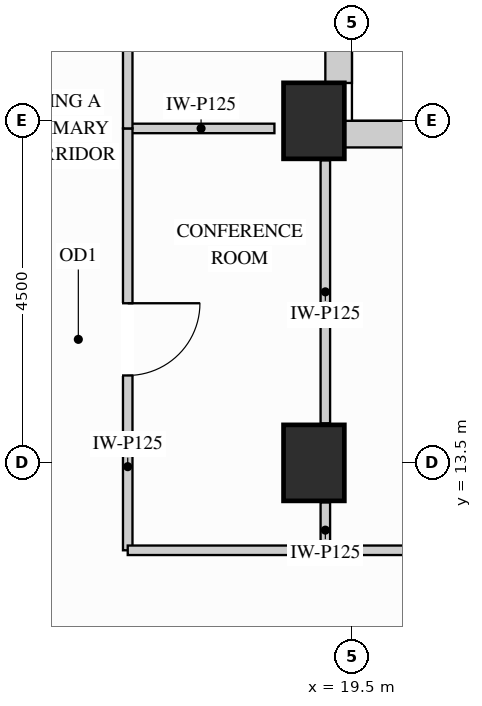
"""IFC4 building model, lengths in metres.
Left out: names, types, materials, properties, quantities, classifications, styles, units other than length and angle.
Written with IfcOpenShell. Run it as: python <this file> out.ifc"""

import sys

from ifc_helpers import new_model, si_unit, direction, frame, frame_2d, origin, origin_2d, place, context, subcontext, project, spatial, rectangle, extrude, source, transform, mapped, element, fill, save


model = new_model("IFC4")
c1 = context("Model", 3, precision=1e-05, world=origin(), true_north=direction((0.0, 1.0)))
c2 = subcontext(c1, "Body", "Model", "MODEL_VIEW")
j1 = project(units=[si_unit("LENGTHUNIT", "METRE"), si_unit("PLANEANGLEUNIT", "RADIAN")], contexts=[c1])
p1 = place(None, origin())
s1 = spatial("IfcSite", under=j1, at=p1, CompositionType="ELEMENT")
p2 = place(p1, origin())
s2 = spatial("IfcBuilding", under=s1, at=p2, CompositionType="ELEMENT")
p3 = place(p2, frame((0.0, 0.0, 171.9)))
s3 = spatial("IfcBuildingStorey", under=s2, at=p3, CompositionType="ELEMENT", Elevation=171.9)
m1 = source(origin(), c2, "Body", "SweptSolid", [
    extrude(rectangle(XDim=0.8, YDim=1.0, at=origin_2d()), origin(), (0.0, 0.0, 1.0), 3.4),
])
for number, where, z_axis, x_axis in (
    (1, (19.0, 13.5, 0.0), (0.0, 0.0, 1.0), (1.0, 0.0, 0.0)),
    (2, (19.0, 18.0, 0.0), (0.0, 0.0, 1.0), (1.0, 0.0, 0.0)),
):
    element("IfcColumn", number, at=place(p3, frame(where, z_axis=z_axis, x_axis=x_axis)), inside=s3, PredefinedType="COLUMN", context=c2, shape_type="MappedRepresentation", body=[
        mapped(m1, transform((0.0, 0.0, 0.0), x_axis=(1.0, 0.0, 0.0), y_axis=(0.0, 1.0, 0.0), z_axis=(0.0, 0.0, 1.0))),
    ])
p4 = place(p3, frame((34.502, 17.825, 0.0), z_axis=(0.0, 0.0, 1.0), x_axis=(-1.0, 0.0, 0.0)))
e3 = element("IfcWall", 3, at=p4, inside=s3, PredefinedType="SOLIDWALL", context=c2, shape_type="SweptSolid", body=[
    extrude(rectangle(XDim=15.104, YDim=0.35, at=frame_2d((7.552, 0.0))), origin(), (0.0, 0.0, 1.0), 3.385),
])
p5 = place(p4, frame((4.131, 0.0, 0.78)))
e4 = element("IfcOpeningElement", 4, at=p5, cuts=e3, PredefinedType="OPENING", context=c2, shape_type="SweptSolid", body=[
    extrude(rectangle(XDim=1.5, YDim=2.0, at=frame_2d((0.75, 1.0))), frame((0.0, 0.185, 0.0), z_axis=(0.0, -1.0, 0.0), x_axis=(1.0, 0.0, 0.0)), (0.0, 0.0, 1.0), 0.37),
])
p6 = place(p4, frame((9.442, 0.0, 0.78)))
e5 = element("IfcOpeningElement", 5, at=p6, cuts=e3, PredefinedType="OPENING", context=c2, shape_type="SweptSolid", body=[
    extrude(rectangle(XDim=1.5, YDim=2.0, at=frame_2d((0.75, 1.0))), frame((0.0, 0.185, 0.0), z_axis=(0.0, -1.0, 0.0), x_axis=(1.0, 0.0, 0.0)), (0.0, 0.0, 1.0), 0.37),
])
p7 = place(p3, frame((19.325, 18.498, 0.0), z_axis=(0.0, 0.0, 1.0), x_axis=(0.0, 1.0, 0.0)))
e6 = element("IfcWall", 6, at=p7, inside=s3, PredefinedType="SOLIDWALL", context=c2, shape_type="SweptSolid", body=[
    extrude(rectangle(XDim=3.504, YDim=0.35, at=frame_2d((1.752, 0.0))), origin(), (0.0, 0.0, 1.0), 2.612),
])
p8 = place(p7, frame((0.433, 0.0, 0.78)))
e7 = element("IfcOpeningElement", 7, at=p8, cuts=e6, PredefinedType="OPENING", context=c2, shape_type="SweptSolid", body=[
    extrude(rectangle(XDim=1.2, YDim=1.652, at=frame_2d((0.6, 0.826))), frame((0.0, 0.185, 0.0), z_axis=(0.0, -1.0, 0.0), x_axis=(1.0, 0.0, 0.0)), (0.0, 0.0, 1.0), 0.37),
])
m2 = source(origin(), c2, "Body", "SweptSolid", [
    extrude(rectangle(XDim=1.93, YDim=0.125, at=frame_2d((0.965, 0.0))), origin(), (0.0, 0.0, 1.0), 2.773),
])
p9 = place(p3, frame((16.55, 17.9, 0.0), z_axis=(0.0, 0.0, 1.0), x_axis=(1.0, 0.0, 0.0)))
e8 = element("IfcWall", 8, at=p9, inside=s3, PredefinedType="PARTITIONING", context=c2, shape_type="MappedRepresentation", body=[
    mapped(m2, transform((0.0, 0.0, 0.0), x_axis=(1.0, 0.0, 0.0), y_axis=(0.0, 1.0, 0.0), z_axis=(0.0, 0.0, 1.0))),
])
m3 = source(origin(), c2, "Body", "SweptSolid", [
    extrude(rectangle(XDim=0.63, YDim=0.125, at=frame_2d((0.315, 0.0))), origin(), (0.0, 0.0, 1.0), 2.773),
])
p10 = place(p3, frame((19.15, 12.35, 0.0), z_axis=(0.0, 0.0, 1.0), x_axis=(0.0, 1.0, 0.0)))
e9 = element("IfcWall", 9, at=p10, inside=s3, PredefinedType="PARTITIONING", context=c2, shape_type="MappedRepresentation", body=[
    mapped(m3, transform((0.0, 0.0, 0.0), x_axis=(1.0, 0.0, 0.0), y_axis=(0.0, 1.0, 0.0), z_axis=(0.0, 0.0, 1.0))),
])
m4 = source(origin(), c2, "Body", "SweptSolid", [
    extrude(rectangle(XDim=3.46, YDim=0.125, at=frame_2d((1.73, 0.0))), origin(), (0.0, 0.0, 1.0), 2.773),
])
p11 = place(p3, frame((19.15, 14.02, 0.0), z_axis=(0.0, 0.0, 1.0), x_axis=(0.0, 1.0, 0.0)))
e10 = element("IfcWall", 10, at=p11, inside=s3, PredefinedType="PARTITIONING", context=c2, shape_type="MappedRepresentation", body=[
    mapped(m4, transform((0.0, 0.0, 0.0), x_axis=(1.0, 0.0, 0.0), y_axis=(0.0, 1.0, 0.0), z_axis=(0.0, 0.0, 1.0))),
])
p12 = place(p3, frame((16.55, 12.35, 0.0), z_axis=(0.0, 0.0, 1.0), x_axis=(0.0, 1.0, 0.0)))
e11 = element("IfcWall", 11, at=p12, inside=s3, PredefinedType="PARTITIONING", context=c2, shape_type="SweptSolid", body=[
    extrude(rectangle(XDim=5.55, YDim=0.125, at=frame_2d((2.775, 0.0))), origin(), (0.0, 0.0, 1.0), 3.385),
])
p13 = place(p12, frame((2.3, 0.0, 0.0)))
e12 = element("IfcOpeningElement", 12, at=p13, cuts=e11, PredefinedType="OPENING", context=c2, shape_type="SweptSolid", body=[
    extrude(rectangle(XDim=0.95, YDim=2.15, at=frame_2d((0.475, 1.075))), frame((0.0, 0.073, 0.0), z_axis=(0.0, -1.0, 0.0), x_axis=(1.0, 0.0, 0.0)), (0.0, 0.0, 1.0), 0.145),
])
p14 = place(p3, frame((16.55, 17.9, 0.0), z_axis=(0.0, 0.0, 1.0), x_axis=(0.0, 1.0, 0.0)))
e13 = element("IfcWall", 13, at=p14, inside=s3, PredefinedType="PARTITIONING", context=c2, shape_type="SweptSolid", body=[
    extrude(rectangle(XDim=5.45, YDim=0.125, at=frame_2d((2.725, 0.0))), origin(), (0.0, 0.0, 1.0), 3.385),
])
p15 = place(p14, frame((2.25, 0.0, 0.0)))
e14 = element("IfcOpeningElement", 14, at=p15, cuts=e13, PredefinedType="OPENING", context=c2, shape_type="SweptSolid", body=[
    extrude(rectangle(XDim=0.95, YDim=2.15, at=frame_2d((0.475, 1.075))), frame((0.0, 0.073, 0.0), z_axis=(0.0, -1.0, 0.0), x_axis=(1.0, 0.0, 0.0)), (0.0, 0.0, 1.0), 0.145),
])
m5 = source(origin(), c2, "Body", "SweptSolid", [
    extrude(rectangle(XDim=2.95, YDim=0.125, at=frame_2d((1.475, 0.0))), origin(), (0.0, 0.0, 1.0), 3.385),
])
p16 = place(p3, frame((16.55, 12.35, 0.0), z_axis=(0.0, 0.0, 1.0), x_axis=(1.0, 0.0, 0.0)))
e15 = element("IfcWall", 15, at=p16, inside=s3, PredefinedType="PARTITIONING", context=c2, shape_type="MappedRepresentation", body=[
    mapped(m5, transform((0.0, 0.0, 0.0), x_axis=(1.0, 0.0, 0.0), y_axis=(0.0, 1.0, 0.0), z_axis=(0.0, 0.0, 1.0))),
])
p17 = place(p3, frame((19.5, 12.35, 0.0), z_axis=(0.0, 0.0, 1.0), x_axis=(1.0, 0.0, 0.0)))
e16 = element("IfcWall", 16, at=p17, inside=s3, PredefinedType="PARTITIONING", context=c2, shape_type="SweptSolid", body=[
    extrude(rectangle(XDim=4.55, YDim=0.125, at=frame_2d((2.275, 0.0))), origin(), (0.0, 0.0, 1.0), 3.385),
])
p18 = place(p17, frame((1.8, 0.0, 0.0)))
e17 = element("IfcOpeningElement", 17, at=p18, cuts=e16, PredefinedType="OPENING", context=c2, shape_type="SweptSolid", body=[
    extrude(rectangle(XDim=0.95, YDim=2.15, at=frame_2d((0.475, 1.075))), frame((0.0, 0.073, 0.0), z_axis=(0.0, -1.0, 0.0), x_axis=(1.0, 0.0, 0.0)), (0.0, 0.0, 1.0), 0.145),
])
m6 = source(origin(), c2, "Body", "SweptSolid", [
    extrude(rectangle(XDim=0.95, YDim=2.15, at=frame_2d((0.475, 1.075))), frame((0.0, 0.025, 0.0), z_axis=(0.0, -1.0, 0.0), x_axis=(1.0, 0.0, 0.0)), (0.0, 0.0, 1.0), 0.05),
])
p19 = place(p13, origin())
e18 = element("IfcDoor", 18, at=p19, inside=s3, OperationType="SINGLE_SWING_RIGHT", PredefinedType="DOOR", context=c2, shape_type="MappedRepresentation", body=[
    mapped(m6, transform((0.0, 0.0, 0.0), x_axis=(1.0, 0.0, 0.0), y_axis=(0.0, 1.0, 0.0), z_axis=(0.0, 0.0, 1.0))),
])
fill(e12, e18)
save(model, sys.argv[1])
